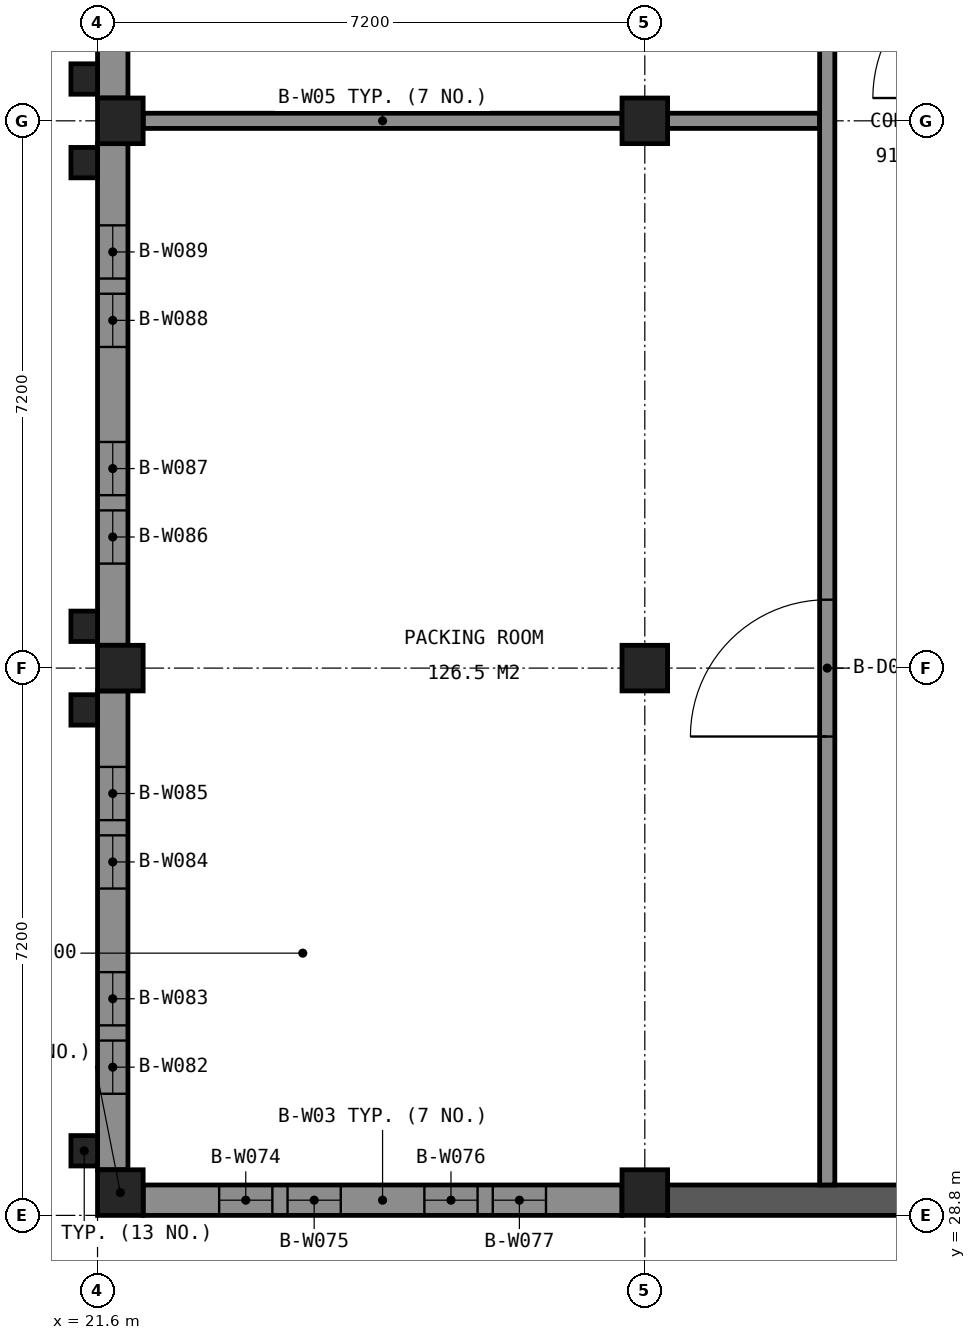
"""IFC4 building model, lengths in metres.
Left out: names, types, materials, properties, quantities, classifications, styles, units other than length and angle.
Written with IfcOpenShell. Run it as: python <this file> out.ifc"""

import sys

from ifc_helpers import new_model, si_unit, direction, frame, frame_2d, origin, origin_2d, place, context, subcontext, project, spatial, rectangle, extrude, element, fill, save


model = new_model("IFC4")
c1 = context("Model", 3, precision=1e-05, world=origin(), true_north=direction((0.0, 1.0)))
c2 = subcontext(c1, "Body", "Model", "MODEL_VIEW")
j1 = project(units=[si_unit("LENGTHUNIT", "METRE"), si_unit("PLANEANGLEUNIT", "RADIAN")], contexts=[c1])
p1 = place(None, origin())
s1 = spatial("IfcSite", under=j1, at=p1, CompositionType="ELEMENT")
p2 = place(p1, origin())
s2 = spatial("IfcBuilding", under=s1, at=p2, CompositionType="ELEMENT")
p3 = place(p2, frame((0.0, 0.0, 4.8)))
s3 = spatial("IfcBuildingStorey", under=s2, at=p3, CompositionType="ELEMENT", Elevation=4.8)
for number, where, z_axis, x_axis in (
    (1, (21.9, 29.1, 0.0), (0.0, 0.0, 1.0), (1.0, 0.0, 0.0)),
    (2, (21.9, 36.0, 0.0), (0.0, 0.0, 1.0), (1.0, 0.0, 0.0)),
    (3, (21.9, 43.2, 0.0), (0.0, 0.0, 1.0), (1.0, 0.0, 0.0)),
    (4, (28.8, 29.1, 0.0), (0.0, 0.0, 1.0), (1.0, 0.0, 0.0)),
    (5, (28.8, 36.0, 0.0), (0.0, 0.0, 1.0), (1.0, 0.0, 0.0)),
    (6, (28.8, 43.2, 0.0), (0.0, 0.0, 1.0), (1.0, 0.0, 0.0)),
):
    element("IfcColumn", number, at=place(p3, frame(where, z_axis=z_axis, x_axis=x_axis)), inside=s3, PredefinedType="COLUMN", context=c2, shape_type="SweptSolid", body=[
        extrude(rectangle(XDim=0.6, YDim=0.6, at=origin_2d()), origin(), (0.0, 0.0, 1.0), 4.8),
    ])
p4 = place(p3, frame((29.1, 29.0, 0.0), z_axis=(0.0, 0.0, 1.0), x_axis=(1.0, 0.0, 0.0)))
e7 = element("IfcWall", 7, at=p4, inside=s3, PredefinedType="SHEAR", context=c2, shape_type="SweptSolid", body=[
    extrude(rectangle(XDim=13.7, YDim=0.4, at=frame_2d((6.85, 0.0))), origin(), (0.0, 0.0, 1.0), 4.55),
])
p5 = place(p3, frame((22.2, 29.0, 0.0), z_axis=(0.0, 0.0, 1.0), x_axis=(1.0, 0.0, 0.0)))
e8 = element("IfcWall", 8, at=p5, inside=s3, PredefinedType="SOLIDWALL", context=c2, shape_type="SweptSolid", body=[
    extrude(rectangle(XDim=6.3, YDim=0.4, at=frame_2d((3.15, 0.0))), origin(), (0.0, 0.0, 1.0), 3.95),
])
p6 = place(p5, frame((1.0, 0.0, 0.9)))
e9 = element("IfcOpeningElement", 9, at=p6, cuts=e8, PredefinedType="OPENING", context=c2, shape_type="SweptSolid", body=[
    extrude(rectangle(XDim=0.7, YDim=2.4, at=frame_2d((0.35, 1.2))), frame((0.0, 0.21, 0.0), z_axis=(0.0, -1.0, 0.0), x_axis=(1.0, 0.0, 0.0)), (0.0, 0.0, 1.0), 0.42),
])
p7 = place(p5, frame((1.9, 0.0, 0.9)))
e10 = element("IfcOpeningElement", 10, at=p7, cuts=e8, PredefinedType="OPENING", context=c2, shape_type="SweptSolid", body=[
    extrude(rectangle(XDim=0.7, YDim=2.4, at=frame_2d((0.35, 1.2))), frame((0.0, 0.21, 0.0), z_axis=(0.0, -1.0, 0.0), x_axis=(1.0, 0.0, 0.0)), (0.0, 0.0, 1.0), 0.42),
])
p8 = place(p5, frame((3.7, 0.0, 0.9)))
e11 = element("IfcOpeningElement", 11, at=p8, cuts=e8, PredefinedType="OPENING", context=c2, shape_type="SweptSolid", body=[
    extrude(rectangle(XDim=0.7, YDim=2.4, at=frame_2d((0.35, 1.2))), frame((0.0, 0.21, 0.0), z_axis=(0.0, -1.0, 0.0), x_axis=(1.0, 0.0, 0.0)), (0.0, 0.0, 1.0), 0.42),
])
p9 = place(p5, frame((4.6, 0.0, 0.9)))
e12 = element("IfcOpeningElement", 12, at=p9, cuts=e8, PredefinedType="OPENING", context=c2, shape_type="SweptSolid", body=[
    extrude(rectangle(XDim=0.7, YDim=2.4, at=frame_2d((0.35, 1.2))), frame((0.0, 0.21, 0.0), z_axis=(0.0, -1.0, 0.0), x_axis=(1.0, 0.0, 0.0)), (0.0, 0.0, 1.0), 0.42),
])
p10 = place(p3, frame((21.8, 29.4, 0.0), z_axis=(0.0, 0.0, 1.0), x_axis=(0.0, 1.0, 0.0)))
e13 = element("IfcWall", 13, at=p10, inside=s3, PredefinedType="SOLIDWALL", context=c2, shape_type="SweptSolid", body=[
    extrude(rectangle(XDim=6.3, YDim=0.4, at=frame_2d((3.15, 0.0))), origin(), (0.0, 0.0, 1.0), 3.95),
])
p11 = place(p10, frame((1.0, 0.0, 0.9)))
e14 = element("IfcOpeningElement", 14, at=p11, cuts=e13, PredefinedType="OPENING", context=c2, shape_type="SweptSolid", body=[
    extrude(rectangle(XDim=0.7, YDim=2.4, at=frame_2d((0.35, 1.2))), frame((0.0, 0.21, 0.0), z_axis=(0.0, -1.0, 0.0), x_axis=(1.0, 0.0, 0.0)), (0.0, 0.0, 1.0), 0.42),
])
p12 = place(p10, frame((1.9, 0.0, 0.9)))
e15 = element("IfcOpeningElement", 15, at=p12, cuts=e13, PredefinedType="OPENING", context=c2, shape_type="SweptSolid", body=[
    extrude(rectangle(XDim=0.7, YDim=2.4, at=frame_2d((0.35, 1.2))), frame((0.0, 0.21, 0.0), z_axis=(0.0, -1.0, 0.0), x_axis=(1.0, 0.0, 0.0)), (0.0, 0.0, 1.0), 0.42),
])
p13 = place(p10, frame((3.7, 0.0, 0.9)))
e16 = element("IfcOpeningElement", 16, at=p13, cuts=e13, PredefinedType="OPENING", context=c2, shape_type="SweptSolid", body=[
    extrude(rectangle(XDim=0.7, YDim=2.4, at=frame_2d((0.35, 1.2))), frame((0.0, 0.21, 0.0), z_axis=(0.0, -1.0, 0.0), x_axis=(1.0, 0.0, 0.0)), (0.0, 0.0, 1.0), 0.42),
])
p14 = place(p10, frame((4.6, 0.0, 0.9)))
e17 = element("IfcOpeningElement", 17, at=p14, cuts=e13, PredefinedType="OPENING", context=c2, shape_type="SweptSolid", body=[
    extrude(rectangle(XDim=0.7, YDim=2.4, at=frame_2d((0.35, 1.2))), frame((0.0, 0.21, 0.0), z_axis=(0.0, -1.0, 0.0), x_axis=(1.0, 0.0, 0.0)), (0.0, 0.0, 1.0), 0.42),
])
p15 = place(p3, frame((21.8, 36.3, 0.0), z_axis=(0.0, 0.0, 1.0), x_axis=(0.0, 1.0, 0.0)))
e18 = element("IfcWall", 18, at=p15, inside=s3, PredefinedType="SOLIDWALL", context=c2, shape_type="SweptSolid", body=[
    extrude(rectangle(XDim=6.6, YDim=0.4, at=frame_2d((3.3, 0.0))), origin(), (0.0, 0.0, 1.0), 3.95),
])
p16 = place(p15, frame((1.075, 0.0, 0.9)))
e19 = element("IfcOpeningElement", 19, at=p16, cuts=e18, PredefinedType="OPENING", context=c2, shape_type="SweptSolid", body=[
    extrude(rectangle(XDim=0.7, YDim=2.4, at=frame_2d((0.35, 1.2))), frame((0.0, 0.21, 0.0), z_axis=(0.0, -1.0, 0.0), x_axis=(1.0, 0.0, 0.0)), (0.0, 0.0, 1.0), 0.42),
])
p17 = place(p15, frame((1.975, 0.0, 0.9)))
e20 = element("IfcOpeningElement", 20, at=p17, cuts=e18, PredefinedType="OPENING", context=c2, shape_type="SweptSolid", body=[
    extrude(rectangle(XDim=0.7, YDim=2.4, at=frame_2d((0.35, 1.2))), frame((0.0, 0.21, 0.0), z_axis=(0.0, -1.0, 0.0), x_axis=(1.0, 0.0, 0.0)), (0.0, 0.0, 1.0), 0.42),
])
p18 = place(p15, frame((3.925, 0.0, 0.9)))
e21 = element("IfcOpeningElement", 21, at=p18, cuts=e18, PredefinedType="OPENING", context=c2, shape_type="SweptSolid", body=[
    extrude(rectangle(XDim=0.7, YDim=2.4, at=frame_2d((0.35, 1.2))), frame((0.0, 0.21, 0.0), z_axis=(0.0, -1.0, 0.0), x_axis=(1.0, 0.0, 0.0)), (0.0, 0.0, 1.0), 0.42),
])
p19 = place(p15, frame((4.825, 0.0, 0.9)))
e22 = element("IfcOpeningElement", 22, at=p19, cuts=e18, PredefinedType="OPENING", context=c2, shape_type="SweptSolid", body=[
    extrude(rectangle(XDim=0.7, YDim=2.4, at=frame_2d((0.35, 1.2))), frame((0.0, 0.21, 0.0), z_axis=(0.0, -1.0, 0.0), x_axis=(1.0, 0.0, 0.0)), (0.0, 0.0, 1.0), 0.42),
])
p20 = place(p3, frame((21.8, 43.5, 0.0), z_axis=(0.0, 0.0, 1.0), x_axis=(0.0, 1.0, 0.0)))
e23 = element("IfcWall", 23, at=p20, inside=s3, PredefinedType="SOLIDWALL", context=c2, shape_type="SweptSolid", body=[
    extrude(rectangle(XDim=6.6, YDim=0.4, at=frame_2d((3.3, 0.0))), origin(), (0.0, 0.0, 1.0), 3.95),
])
p21 = place(p20, frame((1.075, 0.0, 0.9)))
e24 = element("IfcOpeningElement", 24, at=p21, cuts=e23, PredefinedType="OPENING", context=c2, shape_type="SweptSolid", body=[
    extrude(rectangle(XDim=0.7, YDim=2.4, at=frame_2d((0.35, 1.2))), frame((0.0, 0.21, 0.0), z_axis=(0.0, -1.0, 0.0), x_axis=(1.0, 0.0, 0.0)), (0.0, 0.0, 1.0), 0.42),
])
p22 = place(p20, frame((1.975, 0.0, 0.9)))
e25 = element("IfcOpeningElement", 25, at=p22, cuts=e23, PredefinedType="OPENING", context=c2, shape_type="SweptSolid", body=[
    extrude(rectangle(XDim=0.7, YDim=2.4, at=frame_2d((0.35, 1.2))), frame((0.0, 0.21, 0.0), z_axis=(0.0, -1.0, 0.0), x_axis=(1.0, 0.0, 0.0)), (0.0, 0.0, 1.0), 0.42),
])
p23 = place(p20, frame((3.925, 0.0, 0.9)))
e26 = element("IfcOpeningElement", 26, at=p23, cuts=e23, PredefinedType="OPENING", context=c2, shape_type="SweptSolid", body=[
    extrude(rectangle(XDim=0.7, YDim=2.4, at=frame_2d((0.35, 1.2))), frame((0.0, 0.21, 0.0), z_axis=(0.0, -1.0, 0.0), x_axis=(1.0, 0.0, 0.0)), (0.0, 0.0, 1.0), 0.42),
])
p24 = place(p20, frame((4.825, 0.0, 0.9)))
e27 = element("IfcOpeningElement", 27, at=p24, cuts=e23, PredefinedType="OPENING", context=c2, shape_type="SweptSolid", body=[
    extrude(rectangle(XDim=0.7, YDim=2.4, at=frame_2d((0.35, 1.2))), frame((0.0, 0.21, 0.0), z_axis=(0.0, -1.0, 0.0), x_axis=(1.0, 0.0, 0.0)), (0.0, 0.0, 1.0), 0.42),
])
for number, where, z_axis, x_axis in (
    (28, (21.425, 29.65, 0.0), (0.0, 0.0, 1.0), (1.0, 0.0, 0.0)),
    (29, (21.425, 35.45, 0.0), (0.0, 0.0, 1.0), (1.0, 0.0, 0.0)),
    (30, (21.425, 36.55, 0.0), (0.0, 0.0, 1.0), (1.0, 0.0, 0.0)),
    (31, (21.425, 42.65, 0.0), (0.0, 0.0, 1.0), (1.0, 0.0, 0.0)),
    (32, (21.425, 43.75, 0.0), (0.0, 0.0, 1.0), (1.0, 0.0, 0.0)),
):
    element("IfcColumn", number, at=place(p3, frame(where, z_axis=z_axis, x_axis=x_axis)), inside=s3, PredefinedType="COLUMN", context=c2, shape_type="SweptSolid", body=[
        extrude(rectangle(XDim=0.35, YDim=0.4, at=origin_2d()), origin(), (0.0, 0.0, 1.0), 4.8),
    ])
p25 = place(p3, frame((22.2, 43.2, 0.0), z_axis=(0.0, 0.0, 1.0), x_axis=(1.0, 0.0, 0.0)))
e33 = element("IfcWall", 33, at=p25, inside=s3, PredefinedType="PARTITIONING", context=c2, shape_type="SweptSolid", body=[
    extrude(rectangle(XDim=6.3, YDim=0.2, at=frame_2d((3.15, 0.0))), origin(), (0.0, 0.0, 1.0), 3.95),
])
p26 = place(p3, frame((29.1, 43.2, 0.0), z_axis=(0.0, 0.0, 1.0), x_axis=(1.0, 0.0, 0.0)))
e34 = element("IfcWall", 34, at=p26, inside=s3, PredefinedType="PARTITIONING", context=c2, shape_type="SweptSolid", body=[
    extrude(rectangle(XDim=2.0, YDim=0.2, at=frame_2d((1.0, 0.0))), origin(), (0.0, 0.0, 1.0), 3.95),
])
p27 = place(p3, frame((31.2, 29.2, 0.0), z_axis=(0.0, 0.0, 1.0), x_axis=(0.0, 1.0, 0.0)))
e35 = element("IfcWall", 35, at=p27, inside=s3, PredefinedType="PARTITIONING", context=c2, shape_type="SweptSolid", body=[
    extrude(rectangle(XDim=42.4, YDim=0.2, at=frame_2d((21.2, 0.0))), origin(), (0.0, 0.0, 1.0), 3.95),
])
p28 = place(p27, frame((5.9, 0.0, 0.0)))
e36 = element("IfcOpeningElement", 36, at=p28, cuts=e35, PredefinedType="OPENING", context=c2, shape_type="SweptSolid", body=[
    extrude(rectangle(XDim=1.8, YDim=2.1, at=frame_2d((0.9, 1.05))), frame((0.0, 0.11, 0.0), z_axis=(0.0, -1.0, 0.0), x_axis=(1.0, 0.0, 0.0)), (0.0, 0.0, 1.0), 0.22),
])
p29 = place(p27, frame((20.3, 0.0, 0.0)))
e37 = element("IfcOpeningElement", 37, at=p29, cuts=e35, PredefinedType="OPENING", context=c2, shape_type="SweptSolid", body=[
    extrude(rectangle(XDim=1.8, YDim=2.1, at=frame_2d((0.9, 1.05))), frame((0.0, 0.11, 0.0), z_axis=(0.0, -1.0, 0.0), x_axis=(1.0, 0.0, 0.0)), (0.0, 0.0, 1.0), 0.22),
])
p30 = place(p27, frame((34.7, 0.0, 0.0)))
e38 = element("IfcOpeningElement", 38, at=p30, cuts=e35, PredefinedType="OPENING", context=c2, shape_type="SweptSolid", body=[
    extrude(rectangle(XDim=1.8, YDim=2.1, at=frame_2d((0.9, 1.05))), frame((0.0, 0.11, 0.0), z_axis=(0.0, -1.0, 0.0), x_axis=(1.0, 0.0, 0.0)), (0.0, 0.0, 1.0), 0.22),
])
p31 = place(p6, origin())
e39 = element("IfcWindow", 39, at=p31, inside=s3, PartitioningType="SINGLE_PANEL", PredefinedType="WINDOW", context=c2, shape_type="SweptSolid", body=[
    extrude(rectangle(XDim=0.7, YDim=2.4, at=frame_2d((0.35, 1.2))), frame((0.0, 0.03, 0.0), z_axis=(0.0, -1.0, 0.0), x_axis=(1.0, 0.0, 0.0)), (0.0, 0.0, 1.0), 0.06),
])
fill(e9, e39)
p32 = place(p7, origin())
e40 = element("IfcWindow", 40, at=p32, inside=s3, PartitioningType="SINGLE_PANEL", PredefinedType="WINDOW", context=c2, shape_type="SweptSolid", body=[
    extrude(rectangle(XDim=0.7, YDim=2.4, at=frame_2d((0.35, 1.2))), frame((0.0, 0.03, 0.0), z_axis=(0.0, -1.0, 0.0), x_axis=(1.0, 0.0, 0.0)), (0.0, 0.0, 1.0), 0.06),
])
fill(e10, e40)
p33 = place(p8, origin())
e41 = element("IfcWindow", 41, at=p33, inside=s3, PartitioningType="SINGLE_PANEL", PredefinedType="WINDOW", context=c2, shape_type="SweptSolid", body=[
    extrude(rectangle(XDim=0.7, YDim=2.4, at=frame_2d((0.35, 1.2))), frame((0.0, 0.03, 0.0), z_axis=(0.0, -1.0, 0.0), x_axis=(1.0, 0.0, 0.0)), (0.0, 0.0, 1.0), 0.06),
])
fill(e11, e41)
p34 = place(p9, origin())
e42 = element("IfcWindow", 42, at=p34, inside=s3, PartitioningType="SINGLE_PANEL", PredefinedType="WINDOW", context=c2, shape_type="SweptSolid", body=[
    extrude(rectangle(XDim=0.7, YDim=2.4, at=frame_2d((0.35, 1.2))), frame((0.0, 0.03, 0.0), z_axis=(0.0, -1.0, 0.0), x_axis=(1.0, 0.0, 0.0)), (0.0, 0.0, 1.0), 0.06),
])
fill(e12, e42)
p35 = place(p11, origin())
e43 = element("IfcWindow", 43, at=p35, inside=s3, PartitioningType="SINGLE_PANEL", PredefinedType="WINDOW", context=c2, shape_type="SweptSolid", body=[
    extrude(rectangle(XDim=0.7, YDim=2.4, at=frame_2d((0.35, 1.2))), frame((0.0, 0.03, 0.0), z_axis=(0.0, -1.0, 0.0), x_axis=(1.0, 0.0, 0.0)), (0.0, 0.0, 1.0), 0.06),
])
fill(e14, e43)
p36 = place(p12, origin())
e44 = element("IfcWindow", 44, at=p36, inside=s3, PartitioningType="SINGLE_PANEL", PredefinedType="WINDOW", context=c2, shape_type="SweptSolid", body=[
    extrude(rectangle(XDim=0.7, YDim=2.4, at=frame_2d((0.35, 1.2))), frame((0.0, 0.03, 0.0), z_axis=(0.0, -1.0, 0.0), x_axis=(1.0, 0.0, 0.0)), (0.0, 0.0, 1.0), 0.06),
])
fill(e15, e44)
p37 = place(p13, origin())
e45 = element("IfcWindow", 45, at=p37, inside=s3, PartitioningType="SINGLE_PANEL", PredefinedType="WINDOW", context=c2, shape_type="SweptSolid", body=[
    extrude(rectangle(XDim=0.7, YDim=2.4, at=frame_2d((0.35, 1.2))), frame((0.0, 0.03, 0.0), z_axis=(0.0, -1.0, 0.0), x_axis=(1.0, 0.0, 0.0)), (0.0, 0.0, 1.0), 0.06),
])
fill(e16, e45)
p38 = place(p14, origin())
e46 = element("IfcWindow", 46, at=p38, inside=s3, PartitioningType="SINGLE_PANEL", PredefinedType="WINDOW", context=c2, shape_type="SweptSolid", body=[
    extrude(rectangle(XDim=0.7, YDim=2.4, at=frame_2d((0.35, 1.2))), frame((0.0, 0.03, 0.0), z_axis=(0.0, -1.0, 0.0), x_axis=(1.0, 0.0, 0.0)), (0.0, 0.0, 1.0), 0.06),
])
fill(e17, e46)
p39 = place(p16, origin())
e47 = element("IfcWindow", 47, at=p39, inside=s3, PartitioningType="SINGLE_PANEL", PredefinedType="WINDOW", context=c2, shape_type="SweptSolid", body=[
    extrude(rectangle(XDim=0.7, YDim=2.4, at=frame_2d((0.35, 1.2))), frame((0.0, 0.03, 0.0), z_axis=(0.0, -1.0, 0.0), x_axis=(1.0, 0.0, 0.0)), (0.0, 0.0, 1.0), 0.06),
])
fill(e19, e47)
p40 = place(p17, origin())
e48 = element("IfcWindow", 48, at=p40, inside=s3, PartitioningType="SINGLE_PANEL", PredefinedType="WINDOW", context=c2, shape_type="SweptSolid", body=[
    extrude(rectangle(XDim=0.7, YDim=2.4, at=frame_2d((0.35, 1.2))), frame((0.0, 0.03, 0.0), z_axis=(0.0, -1.0, 0.0), x_axis=(1.0, 0.0, 0.0)), (0.0, 0.0, 1.0), 0.06),
])
fill(e20, e48)
p41 = place(p18, origin())
e49 = element("IfcWindow", 49, at=p41, inside=s3, PartitioningType="SINGLE_PANEL", PredefinedType="WINDOW", context=c2, shape_type="SweptSolid", body=[
    extrude(rectangle(XDim=0.7, YDim=2.4, at=frame_2d((0.35, 1.2))), frame((0.0, 0.03, 0.0), z_axis=(0.0, -1.0, 0.0), x_axis=(1.0, 0.0, 0.0)), (0.0, 0.0, 1.0), 0.06),
])
fill(e21, e49)
p42 = place(p19, origin())
e50 = element("IfcWindow", 50, at=p42, inside=s3, PartitioningType="SINGLE_PANEL", PredefinedType="WINDOW", context=c2, shape_type="SweptSolid", body=[
    extrude(rectangle(XDim=0.7, YDim=2.4, at=frame_2d((0.35, 1.2))), frame((0.0, 0.03, 0.0), z_axis=(0.0, -1.0, 0.0), x_axis=(1.0, 0.0, 0.0)), (0.0, 0.0, 1.0), 0.06),
])
fill(e22, e50)
p43 = place(p28, origin())
e51 = element("IfcDoor", 51, at=p43, inside=s3, OperationType="DOUBLE_DOOR_DOUBLE_SWING", PredefinedType="DOOR", context=c2, shape_type="SweptSolid", body=[
    extrude(rectangle(XDim=1.8, YDim=2.1, at=frame_2d((0.9, 1.05))), frame((0.0, 0.025, 0.0), z_axis=(0.0, -1.0, 0.0), x_axis=(1.0, 0.0, 0.0)), (0.0, 0.0, 1.0), 0.05),
])
fill(e36, e51)
save(model, sys.argv[1])
